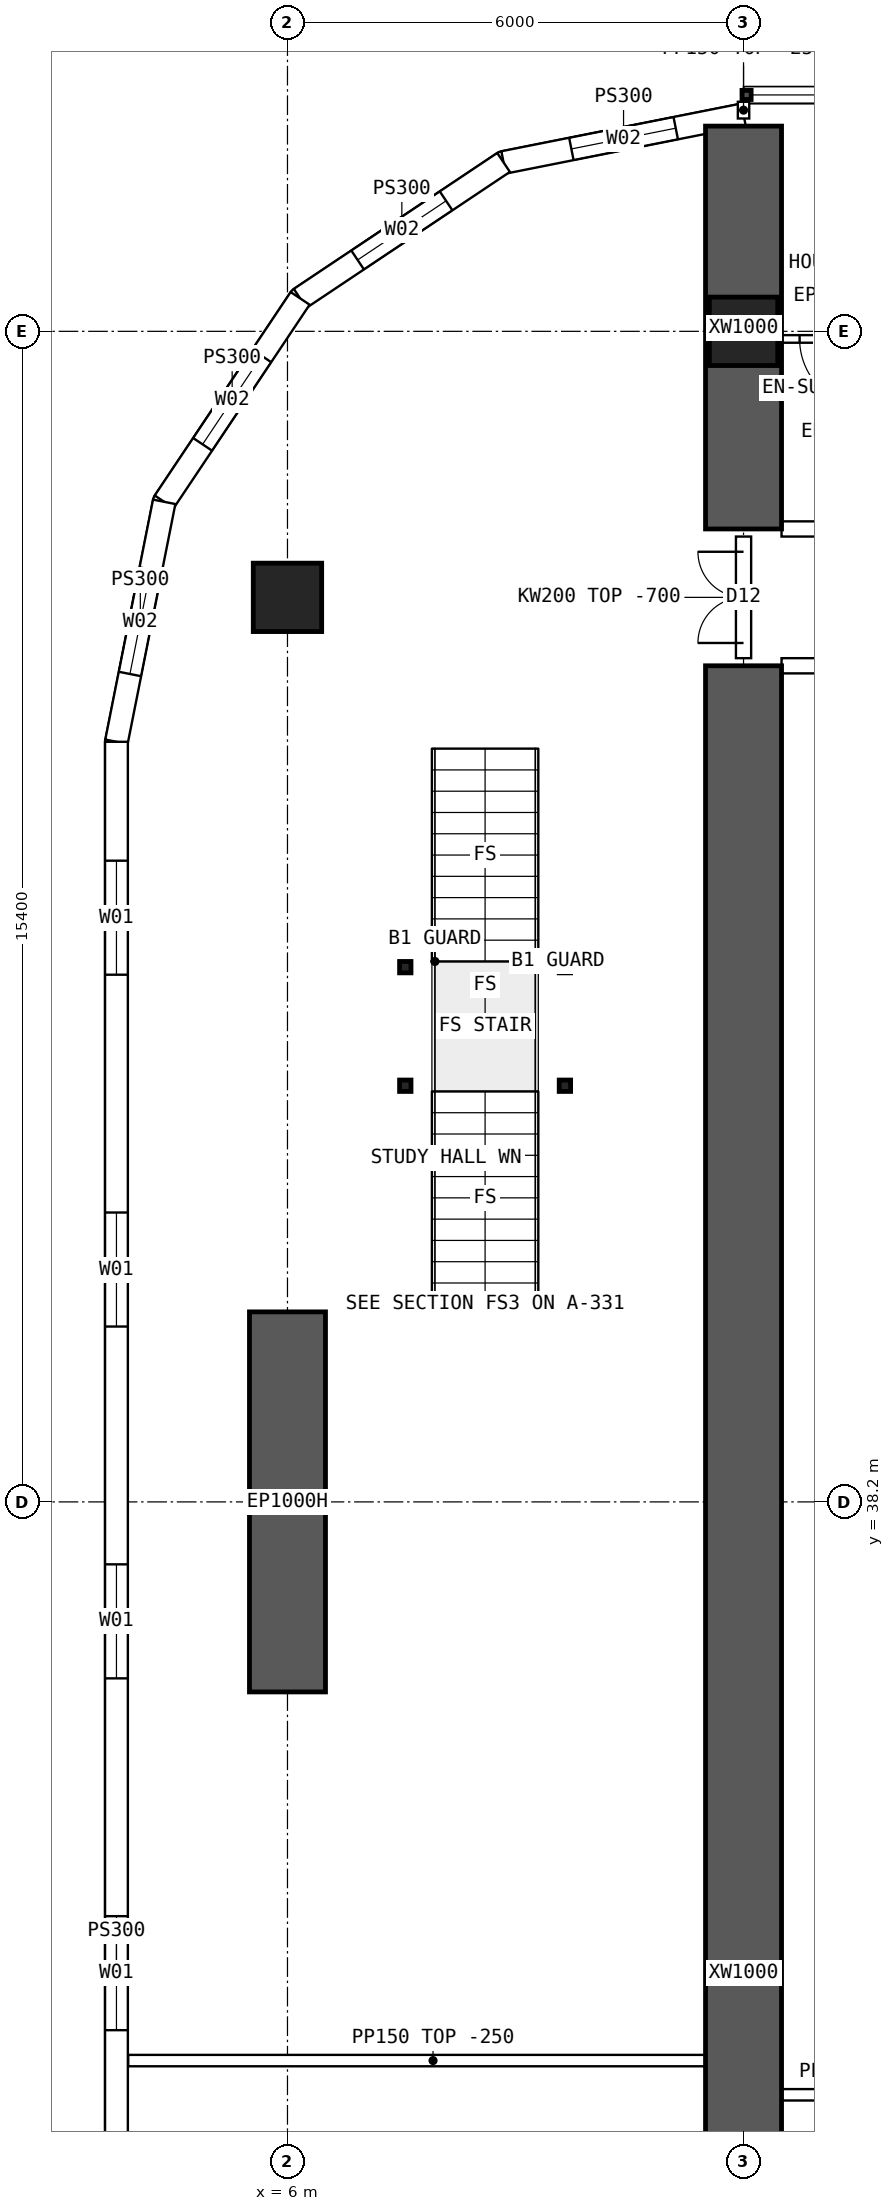
"""IFC4 building model, lengths in metres.
Left out: names, types, materials, properties, quantities, classifications, styles, units other than length and angle.
Written with IfcOpenShell. Run it as: python <this file> out.ifc"""

import sys

from ifc_helpers import new_model, si_unit, direction, frame, frame_2d, origin, origin_2d, place, context, subcontext, project, spatial, polyline, rectangle, hollow_rectangle, outline, extrude, element, fill, save


model = new_model("IFC4")
c1 = context("Model", 3, precision=1e-05, world=origin(), true_north=direction((0.0, 1.0)))
c2 = subcontext(c1, "Body", "Model", "MODEL_VIEW")
j1 = project(units=[si_unit("LENGTHUNIT", "METRE"), si_unit("PLANEANGLEUNIT", "RADIAN")], contexts=[c1])
p1 = place(None, origin())
s1 = spatial("IfcSite", under=j1, at=p1, CompositionType="ELEMENT")
p2 = place(p1, origin())
s2 = spatial("IfcBuilding", under=s1, at=p2, CompositionType="ELEMENT")
p3 = place(p2, frame((0.0, 0.0, 23.95)))
s3 = spatial("IfcBuildingStorey", under=s2, at=p3, CompositionType="ELEMENT", Elevation=23.95)
for number, where, z_axis, x_axis in (
    (1, (12.0, 53.6, 0.0), (0.0, 0.0, 1.0), (1.0, 0.0, 0.0)),
    (2, (6.0, 50.1, 0.0), (0.0, 0.0, 1.0), (1.0, 0.0, 0.0)),
):
    element("IfcColumn", number, at=place(p3, frame(where, z_axis=z_axis, x_axis=x_axis)), inside=s3, PredefinedType="COLUMN", context=c2, shape_type="SweptSolid", body=[
        extrude(hollow_rectangle(XDim=0.9, YDim=0.9, WallThickness=0.09, at=origin_2d()), origin(), (0.0, 0.0, 1.0), 3.75),
    ])
p4 = place(p3, frame((6.0, 35.7, 0.0), z_axis=(0.0, 0.0, 1.0), x_axis=(0.0, 1.0, 0.0)))
e3 = element("IfcWall", 3, at=p4, inside=s3, PredefinedType="SHEAR", context=c2, shape_type="SweptSolid", body=[
    extrude(rectangle(XDim=5.0, YDim=1.0, at=frame_2d((2.5, 0.0))), origin(), (0.0, 0.0, 1.0), 3.75),
])
p5 = place(p3, frame((12.0, 51.0, 0.0), z_axis=(0.0, 0.0, 1.0), x_axis=(0.0, 1.0, 0.0)))
e4 = element("IfcWall", 4, at=p5, inside=s3, PredefinedType="SHEAR", context=c2, shape_type="SweptSolid", body=[
    extrude(rectangle(XDim=5.3, YDim=1.0, at=frame_2d((2.65, 0.0))), origin(), (0.0, 0.0, 1.0), 3.75),
])
p6 = place(p3, frame((12.0, 14.8, 0.0), z_axis=(0.0, 0.0, 1.0), x_axis=(0.0, 1.0, 0.0)))
e5 = element("IfcWall", 5, at=p6, inside=s3, PredefinedType="SHEAR", context=c2, shape_type="SweptSolid", body=[
    extrude(rectangle(XDim=34.4, YDim=1.0, at=frame_2d((17.2, 0.0))), origin(), (0.0, 0.0, 1.0), 3.75),
])
p7 = place(p3, frame((3.75, 48.2, 0.0), z_axis=(0.0, 0.0, 1.0), x_axis=(0.0, -1.0, 0.0)))
e6 = element("IfcWall", 6, at=p7, inside=s3, PredefinedType="SOLIDWALL", context=c2, shape_type="SweptSolid", body=[
    extrude(outline(polyline([(-0.015, -0.15), (32.415, -0.15), (32.385, 0.15), (0.015, 0.15), (-0.015, -0.15)])), origin(), (0.0, 0.0, 1.0), 3.5),
])
p8 = place(p7, frame((1.564, 0.0, 0.9)))
e7 = element("IfcOpeningElement", 7, at=p8, cuts=e6, PredefinedType="OPENING", context=c2, shape_type="SweptSolid", body=[
    extrude(rectangle(XDim=1.5, YDim=2.0, at=frame_2d((0.75, 1.0))), frame((0.0, 0.16, 0.0), z_axis=(0.0, -1.0, 0.0), x_axis=(1.0, 0.0, 0.0)), (0.0, 0.0, 1.0), 0.32),
])
p9 = place(p7, frame((6.193, 0.0, 0.9)))
e8 = element("IfcOpeningElement", 8, at=p9, cuts=e6, PredefinedType="OPENING", context=c2, shape_type="SweptSolid", body=[
    extrude(rectangle(XDim=1.5, YDim=2.0, at=frame_2d((0.75, 1.0))), frame((0.0, 0.16, 0.0), z_axis=(0.0, -1.0, 0.0), x_axis=(1.0, 0.0, 0.0)), (0.0, 0.0, 1.0), 0.32),
])
p10 = place(p7, frame((10.822, 0.0, 0.9)))
e9 = element("IfcOpeningElement", 9, at=p10, cuts=e6, PredefinedType="OPENING", context=c2, shape_type="SweptSolid", body=[
    extrude(rectangle(XDim=1.5, YDim=2.0, at=frame_2d((0.75, 1.0))), frame((0.0, 0.16, 0.0), z_axis=(0.0, -1.0, 0.0), x_axis=(1.0, 0.0, 0.0)), (0.0, 0.0, 1.0), 0.32),
])
p11 = place(p7, frame((15.45, 0.0, 0.9)))
e10 = element("IfcOpeningElement", 10, at=p11, cuts=e6, PredefinedType="OPENING", context=c2, shape_type="SweptSolid", body=[
    extrude(rectangle(XDim=1.5, YDim=2.0, at=frame_2d((0.75, 1.0))), frame((0.0, 0.16, 0.0), z_axis=(0.0, -1.0, 0.0), x_axis=(1.0, 0.0, 0.0)), (0.0, 0.0, 1.0), 0.32),
])
p12 = place(p7, frame((20.079, 0.0, 0.9)))
e11 = element("IfcOpeningElement", 11, at=p12, cuts=e6, PredefinedType="OPENING", context=c2, shape_type="SweptSolid", body=[
    extrude(rectangle(XDim=1.5, YDim=2.0, at=frame_2d((0.75, 1.0))), frame((0.0, 0.16, 0.0), z_axis=(0.0, -1.0, 0.0), x_axis=(1.0, 0.0, 0.0)), (0.0, 0.0, 1.0), 0.32),
])
p13 = place(p7, frame((24.707, 0.0, 0.9)))
e12 = element("IfcOpeningElement", 12, at=p13, cuts=e6, PredefinedType="OPENING", context=c2, shape_type="SweptSolid", body=[
    extrude(rectangle(XDim=1.5, YDim=2.0, at=frame_2d((0.75, 1.0))), frame((0.0, 0.16, 0.0), z_axis=(0.0, -1.0, 0.0), x_axis=(1.0, 0.0, 0.0)), (0.0, 0.0, 1.0), 0.32),
])
p14 = place(p7, frame((29.336, 0.0, 0.9)))
e13 = element("IfcOpeningElement", 13, at=p14, cuts=e6, PredefinedType="OPENING", context=c2, shape_type="SweptSolid", body=[
    extrude(rectangle(XDim=1.5, YDim=2.0, at=frame_2d((0.75, 1.0))), frame((0.0, 0.16, 0.0), z_axis=(0.0, -1.0, 0.0), x_axis=(1.0, 0.0, 0.0)), (0.0, 0.0, 1.0), 0.32),
])
p15 = place(p3, frame((12.0, 56.45, 0.0), z_axis=(0.0, 0.0, 1.0), x_axis=(-0.980787251524, -0.195080412259, 0.0)))
e14 = element("IfcWall", 14, at=p15, inside=s3, PredefinedType="SOLIDWALL", context=c2, shape_type="SweptSolid", body=[
    extrude(outline(polyline([(-0.03, -0.15), (3.249, -0.15), (3.189, 0.15), (0.03, 0.15), (-0.03, -0.15)])), origin(), (0.0, 0.0, 1.0), 3.5),
])
p16 = place(p15, frame((0.909, 0.0, 0.9)))
e15 = element("IfcOpeningElement", 15, at=p16, cuts=e14, PredefinedType="OPENING", context=c2, shape_type="SweptSolid", body=[
    extrude(rectangle(XDim=1.4, YDim=1.8, at=frame_2d((0.7, 0.9))), frame((0.0, 0.16, 0.0), z_axis=(0.0, -1.0, 0.0), x_axis=(1.0, 0.0, 0.0)), (0.0, 0.0, 1.0), 0.32),
])
p17 = place(p3, frame((8.843, 55.822, 0.0), z_axis=(0.0, 0.0, 1.0), x_axis=(-0.831478105043, -0.555557522525, 0.0)))
e16 = element("IfcWall", 16, at=p17, inside=s3, PredefinedType="SOLIDWALL", context=c2, shape_type="SweptSolid", body=[
    extrude(outline(polyline([(-0.03, -0.15), (3.249, -0.15), (3.189, 0.15), (0.03, 0.15), (-0.03, -0.15)])), origin(), (0.0, 0.0, 1.0), 3.5),
])
p18 = place(p17, frame((0.909, 0.0, 0.9)))
e17 = element("IfcOpeningElement", 17, at=p18, cuts=e16, PredefinedType="OPENING", context=c2, shape_type="SweptSolid", body=[
    extrude(rectangle(XDim=1.4, YDim=1.8, at=frame_2d((0.7, 0.9))), frame((0.0, 0.16, 0.0), z_axis=(0.0, -1.0, 0.0), x_axis=(1.0, 0.0, 0.0)), (0.0, 0.0, 1.0), 0.32),
])
p19 = place(p3, frame((6.167, 54.034, 0.0), z_axis=(0.0, 0.0, 1.0), x_axis=(-0.555609954424, -0.831443069936, 0.0)))
e18 = element("IfcWall", 18, at=p19, inside=s3, PredefinedType="SOLIDWALL", context=c2, shape_type="SweptSolid", body=[
    extrude(outline(polyline([(-0.03, -0.15), (3.249, -0.15), (3.189, 0.15), (0.03, 0.15), (-0.03, -0.15)])), origin(), (0.0, 0.0, 1.0), 3.5),
])
p20 = place(p19, frame((0.909, 0.0, 0.9)))
e19 = element("IfcOpeningElement", 19, at=p20, cuts=e18, PredefinedType="OPENING", context=c2, shape_type="SweptSolid", body=[
    extrude(rectangle(XDim=1.4, YDim=1.8, at=frame_2d((0.7, 0.9))), frame((0.0, 0.16, 0.0), z_axis=(0.0, -1.0, 0.0), x_axis=(1.0, 0.0, 0.0)), (0.0, 0.0, 1.0), 0.32),
])
p21 = place(p3, frame((4.378, 51.357, 0.0), z_axis=(0.0, 0.0, 1.0), x_axis=(-0.195065901187, -0.980790137692, 0.0)))
e20 = element("IfcWall", 20, at=p21, inside=s3, PredefinedType="SOLIDWALL", context=c2, shape_type="SweptSolid", body=[
    extrude(outline(polyline([(-0.03, -0.15), (3.234, -0.15), (3.204, 0.15), (0.03, 0.15), (-0.03, -0.15)])), origin(), (0.0, 0.0, 1.0), 3.5),
])
p22 = place(p21, frame((0.909, 0.0, 0.9)))
e21 = element("IfcOpeningElement", 21, at=p22, cuts=e20, PredefinedType="OPENING", context=c2, shape_type="SweptSolid", body=[
    extrude(rectangle(XDim=1.4, YDim=1.8, at=frame_2d((0.7, 0.9))), frame((0.0, 0.16, 0.0), z_axis=(0.0, -1.0, 0.0), x_axis=(1.0, 0.0, 0.0)), (0.0, 0.0, 1.0), 0.32),
])
p23 = place(p3, frame((12.5, 51.0, 0.0), z_axis=(0.0, 0.0, 1.0), x_axis=(1.0, 0.0, 0.0)))
e22 = element("IfcWall", 22, at=p23, inside=s3, PredefinedType="SOLIDWALL", context=c2, shape_type="SweptSolid", body=[
    extrude(outline(polyline([(0.0, 0.0), (5.0, 0.0), (5.0, 3.1), (0.0, 3.1), (0.0, 0.0)])), frame((0.0, 0.1, 0.0), z_axis=(0.0, -1.0, 0.0), x_axis=(1.0, 0.0, 0.0)), (0.0, 0.0, 1.0), 0.2),
])
p24 = place(p23, frame((1.425, 0.0, 0.0)))
e23 = element("IfcOpeningElement", 23, at=p24, cuts=e22, PredefinedType="OPENING", context=c2, shape_type="SweptSolid", body=[
    extrude(rectangle(XDim=0.9, YDim=2.1, at=frame_2d((0.45, 1.05))), frame((0.0, 0.11, 0.0), z_axis=(0.0, -1.0, 0.0), x_axis=(1.0, 0.0, 0.0)), (0.0, 0.0, 1.0), 0.22),
])
p25 = place(p23, frame((2.675, 0.0, 0.0)))
e24 = element("IfcOpeningElement", 24, at=p25, cuts=e22, PredefinedType="OPENING", context=c2, shape_type="SweptSolid", body=[
    extrude(rectangle(XDim=0.9, YDim=2.1, at=frame_2d((0.45, 1.05))), frame((0.0, 0.11, 0.0), z_axis=(0.0, -1.0, 0.0), x_axis=(1.0, 0.0, 0.0)), (0.0, 0.0, 1.0), 0.22),
])
p26 = place(p3, frame((12.5, 49.2, 0.0), z_axis=(0.0, 0.0, 1.0), x_axis=(1.0, 0.0, 0.0)))
e25 = element("IfcWall", 25, at=p26, inside=s3, PredefinedType="SOLIDWALL", context=c2, shape_type="SweptSolid", body=[
    extrude(rectangle(XDim=5.0, YDim=0.2, at=frame_2d((2.5, 0.0))), origin(), (0.0, 0.0, 1.0), 3.5),
])
p27 = place(p26, frame((3.3, 0.0, 0.0)))
e26 = element("IfcOpeningElement", 26, at=p27, cuts=e25, PredefinedType="OPENING", context=c2, shape_type="SweptSolid", body=[
    extrude(rectangle(XDim=1.6, YDim=2.1, at=frame_2d((0.8, 1.05))), frame((0.0, 0.11, 0.0), z_axis=(0.0, -1.0, 0.0), x_axis=(1.0, 0.0, 0.0)), (0.0, 0.0, 1.0), 0.22),
])
p28 = place(p3, frame((12.45, 53.5, 0.0), z_axis=(0.0, 0.0, 1.0), x_axis=(1.0, 0.0, 0.0)))
e27 = element("IfcWall", 27, at=p28, inside=s3, PredefinedType="PARTITIONING", context=c2, shape_type="SweptSolid", body=[
    extrude(outline(polyline([(0.0, 0.0), (1.425, 0.0), (1.425, 3.1), (0.0, 3.1), (0.0, 0.0)])), frame((0.0, 0.05, 0.0), z_axis=(0.0, -1.0, 0.0), x_axis=(1.0, 0.0, 0.0)), (0.0, 0.0, 1.0), 0.1),
])
p29 = place(p28, frame((0.288, 0.0, 0.0)))
e28 = element("IfcOpeningElement", 28, at=p29, cuts=e27, PredefinedType="OPENING", context=c2, shape_type="SweptSolid", body=[
    extrude(rectangle(XDim=0.9, YDim=2.1, at=frame_2d((0.45, 1.05))), frame((0.0, 0.06, 0.0), z_axis=(0.0, -1.0, 0.0), x_axis=(1.0, 0.0, 0.0)), (0.0, 0.0, 1.0), 0.12),
])
p30 = place(p3, frame((12.0, 30.4, 0.0), z_axis=(0.0, 0.0, 1.0), x_axis=(1.0, 0.0, 0.0)))
e29 = element("IfcWall", 29, at=p30, inside=s3, PredefinedType="PARTITIONING", context=c2, shape_type="SweptSolid", body=[
    extrude(rectangle(XDim=3.6, YDim=0.15, at=frame_2d((1.8, 0.0))), origin(), (0.0, 0.0, 1.0), 3.5),
])
p31 = place(p3, frame((3.905, 30.85, 0.0), z_axis=(0.0, 0.0, 1.0), x_axis=(1.0, 0.0, 0.0)))
e30 = element("IfcWall", 30, at=p31, inside=s3, PredefinedType="PARTITIONING", context=c2, shape_type="SweptSolid", body=[
    extrude(outline(polyline([(0.0, 0.0), (8.02, 0.0), (8.02, 3.5), (2.397, 3.5), (2.395, 3.05), (1.797, 3.05), (1.795, 3.5), (0.0, 3.5), (0.0, 0.0)])), frame((0.0, 0.075, 0.0), z_axis=(0.0, -1.0, 0.0), x_axis=(1.0, 0.0, 0.0)), (0.0, 0.0, 1.0), 0.15),
])
p32 = place(p3, frame((12.0, 49.3, 0.0), z_axis=(0.0, 0.0, 1.0), x_axis=(0.0, 1.0, 0.0)))
e31 = element("IfcWall", 31, at=p32, inside=s3, PredefinedType="SOLIDWALL", context=c2, shape_type="SweptSolid", body=[
    extrude(outline(polyline([(0.0, 0.0), (1.6, 0.0), (1.6, 3.05), (0.0, 3.05), (0.0, 0.0)])), frame((0.0, 0.1, 0.0), z_axis=(0.0, -1.0, 0.0), x_axis=(1.0, 0.0, 0.0)), (0.0, 0.0, 1.0), 0.2),
])
p33 = place(p32, frame((0.2, 0.0, 0.0)))
e32 = element("IfcOpeningElement", 32, at=p33, cuts=e31, PredefinedType="OPENING", context=c2, shape_type="SweptSolid", body=[
    extrude(rectangle(XDim=1.2, YDim=2.1, at=frame_2d((0.6, 1.05))), frame((0.0, 0.11, 0.0), z_axis=(0.0, -1.0, 0.0), x_axis=(1.0, 0.0, 0.0)), (0.0, 0.0, 1.0), 0.22),
])
p34 = place(p3, frame((12.0, 56.4, 0.0), z_axis=(0.0, 0.0, 1.0), x_axis=(0.0, 1.0, 0.0)))
e33 = element("IfcWall", 33, at=p34, inside=s3, PredefinedType="PARTITIONING", context=c2, shape_type="SweptSolid", body=[
    extrude(rectangle(XDim=0.22, YDim=0.15, at=frame_2d((0.11, 0.0))), origin(), (0.0, 0.0, 1.0), 3.5),
])
for number, where, z_axis, x_axis in (
    (34, (7.55, 43.675, 0.0), (0.0, 0.0, 1.0), (1.0, 0.0, 0.0)),
    (35, (9.65, 43.675, 0.0), (0.0, 0.0, 1.0), (1.0, 0.0, 0.0)),
    (36, (7.55, 45.235, 0.0), (0.0, 0.0, 1.0), (1.0, 0.0, 0.0)),
    (37, (9.65, 45.235, 0.0), (0.0, 0.0, 1.0), (1.0, 0.0, 0.0)),
):
    element("IfcColumn", number, at=place(p3, frame(where, z_axis=z_axis, x_axis=x_axis)), inside=s3, PredefinedType="COLUMN", context=c2, shape_type="SweptSolid", body=[
        extrude(hollow_rectangle(XDim=0.15, YDim=0.15, WallThickness=0.008, at=origin_2d()), origin(), (0.0, 0.0, 1.0), 3.5),
    ])
p35 = place(p8, origin())
e38 = element("IfcWindow", 38, at=p35, inside=s3, PartitioningType="SINGLE_PANEL", PredefinedType="WINDOW", context=c2, shape_type="SweptSolid", body=[
    extrude(rectangle(XDim=1.5, YDim=2.0, at=frame_2d((0.75, 1.0))), frame((0.0, 0.03, 0.0), z_axis=(0.0, -1.0, 0.0), x_axis=(1.0, 0.0, 0.0)), (0.0, 0.0, 1.0), 0.06),
])
fill(e7, e38)
p36 = place(p9, origin())
e39 = element("IfcWindow", 39, at=p36, inside=s3, PartitioningType="SINGLE_PANEL", PredefinedType="WINDOW", context=c2, shape_type="SweptSolid", body=[
    extrude(rectangle(XDim=1.5, YDim=2.0, at=frame_2d((0.75, 1.0))), frame((0.0, 0.03, 0.0), z_axis=(0.0, -1.0, 0.0), x_axis=(1.0, 0.0, 0.0)), (0.0, 0.0, 1.0), 0.06),
])
fill(e8, e39)
p37 = place(p10, origin())
e40 = element("IfcWindow", 40, at=p37, inside=s3, PartitioningType="SINGLE_PANEL", PredefinedType="WINDOW", context=c2, shape_type="SweptSolid", body=[
    extrude(rectangle(XDim=1.5, YDim=2.0, at=frame_2d((0.75, 1.0))), frame((0.0, 0.03, 0.0), z_axis=(0.0, -1.0, 0.0), x_axis=(1.0, 0.0, 0.0)), (0.0, 0.0, 1.0), 0.06),
])
fill(e9, e40)
p38 = place(p11, origin())
e41 = element("IfcWindow", 41, at=p38, inside=s3, PartitioningType="SINGLE_PANEL", PredefinedType="WINDOW", context=c2, shape_type="SweptSolid", body=[
    extrude(rectangle(XDim=1.5, YDim=2.0, at=frame_2d((0.75, 1.0))), frame((0.0, 0.03, 0.0), z_axis=(0.0, -1.0, 0.0), x_axis=(1.0, 0.0, 0.0)), (0.0, 0.0, 1.0), 0.06),
])
fill(e10, e41)
p39 = place(p16, origin())
e42 = element("IfcWindow", 42, at=p39, inside=s3, PartitioningType="SINGLE_PANEL", PredefinedType="WINDOW", context=c2, shape_type="SweptSolid", body=[
    extrude(rectangle(XDim=1.4, YDim=1.8, at=frame_2d((0.7, 0.9))), frame((0.0, 0.03, 0.0), z_axis=(0.0, -1.0, 0.0), x_axis=(1.0, 0.0, 0.0)), (0.0, 0.0, 1.0), 0.06),
])
fill(e15, e42)
p40 = place(p18, origin())
e43 = element("IfcWindow", 43, at=p40, inside=s3, PartitioningType="SINGLE_PANEL", PredefinedType="WINDOW", context=c2, shape_type="SweptSolid", body=[
    extrude(rectangle(XDim=1.4, YDim=1.8, at=frame_2d((0.7, 0.9))), frame((0.0, 0.03, 0.0), z_axis=(0.0, -1.0, 0.0), x_axis=(1.0, 0.0, 0.0)), (0.0, 0.0, 1.0), 0.06),
])
fill(e17, e43)
p41 = place(p20, origin())
e44 = element("IfcWindow", 44, at=p41, inside=s3, PartitioningType="SINGLE_PANEL", PredefinedType="WINDOW", context=c2, shape_type="SweptSolid", body=[
    extrude(rectangle(XDim=1.4, YDim=1.8, at=frame_2d((0.7, 0.9))), frame((0.0, 0.03, 0.0), z_axis=(0.0, -1.0, 0.0), x_axis=(1.0, 0.0, 0.0)), (0.0, 0.0, 1.0), 0.06),
])
fill(e19, e44)
p42 = place(p22, origin())
e45 = element("IfcWindow", 45, at=p42, inside=s3, PartitioningType="SINGLE_PANEL", PredefinedType="WINDOW", context=c2, shape_type="SweptSolid", body=[
    extrude(rectangle(XDim=1.4, YDim=1.8, at=frame_2d((0.7, 0.9))), frame((0.0, 0.03, 0.0), z_axis=(0.0, -1.0, 0.0), x_axis=(1.0, 0.0, 0.0)), (0.0, 0.0, 1.0), 0.06),
])
fill(e21, e45)
p43 = place(p29, origin())
e46 = element("IfcDoor", 46, at=p43, inside=s3, OperationType="SINGLE_SWING_RIGHT", PredefinedType="DOOR", context=c2, shape_type="SweptSolid", body=[
    extrude(rectangle(XDim=0.9, YDim=2.1, at=frame_2d((0.45, 1.05))), frame((0.0, 0.025, 0.0), z_axis=(0.0, -1.0, 0.0), x_axis=(1.0, 0.0, 0.0)), (0.0, 0.0, 1.0), 0.05),
])
fill(e28, e46)
p44 = place(p33, origin())
e47 = element("IfcDoor", 47, at=p44, inside=s3, OperationType="DOUBLE_DOOR_SINGLE_SWING", PredefinedType="DOOR", context=c2, shape_type="SweptSolid", body=[
    extrude(rectangle(XDim=1.2, YDim=2.1, at=frame_2d((0.6, 1.05))), frame((0.0, 0.025, 0.0), z_axis=(0.0, -1.0, 0.0), x_axis=(1.0, 0.0, 0.0)), (0.0, 0.0, 1.0), 0.05),
])
fill(e32, e47)
save(model, sys.argv[1])
